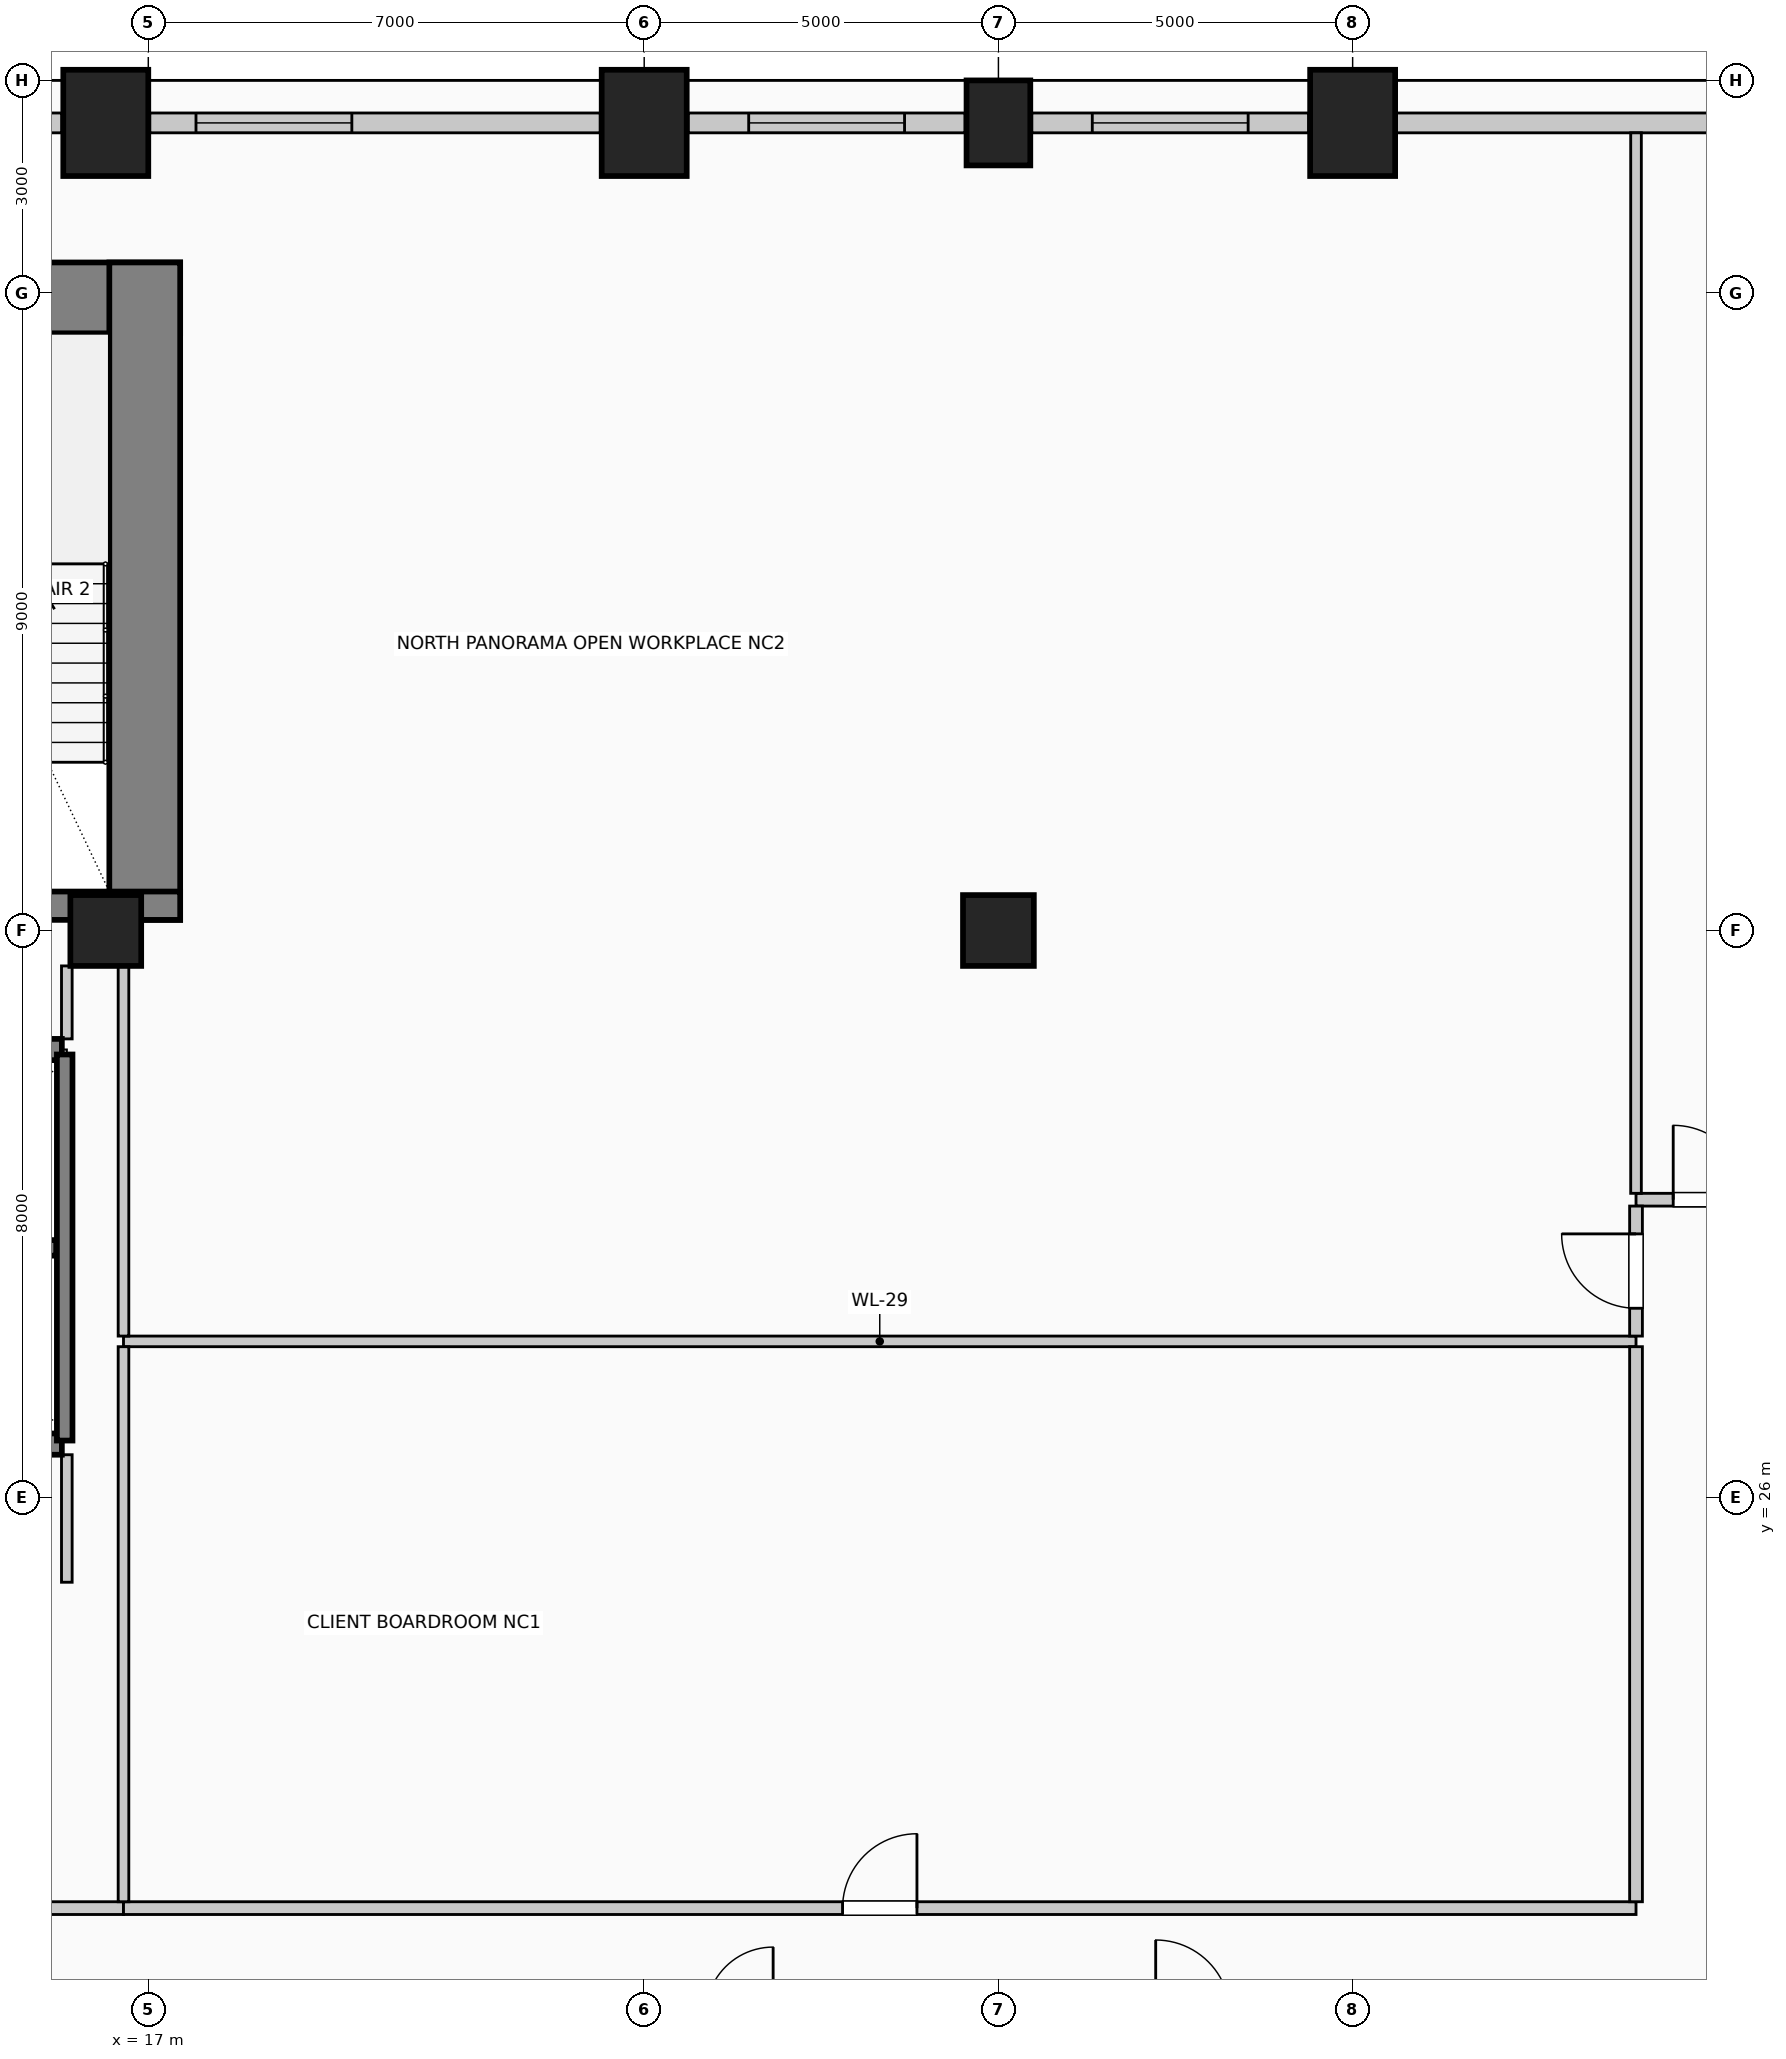
"""IFC4 building model, lengths in metres.
Left out: names, types, materials, properties, quantities, classifications, styles, units other than length and angle.
Written with IfcOpenShell. Run it as: python <this file> out.ifc"""

import sys

from ifc_helpers import new_model, si_unit, direction, frame, frame_2d, origin, origin_2d, place, context, subcontext, project, spatial, rectangle, circle, extrude, element, fill, save


model = new_model("IFC4")
c1 = context("Model", 3, precision=1e-05, world=origin(), true_north=direction((0.0, 1.0)))
c2 = subcontext(c1, "Body", "Model", "MODEL_VIEW")
j1 = project(units=[si_unit("LENGTHUNIT", "METRE"), si_unit("PLANEANGLEUNIT", "RADIAN")], contexts=[c1])
p1 = place(None, origin())
s1 = spatial("IfcSite", under=j1, at=p1, CompositionType="ELEMENT")
p2 = place(p1, origin())
s2 = spatial("IfcBuilding", under=s1, at=p2, CompositionType="ELEMENT")
p3 = place(p2, frame((0.0, 0.0, 66.6)))
s3 = spatial("IfcBuildingStorey", under=s2, at=p3, CompositionType="ELEMENT", Elevation=66.6)
p4 = place(p3, frame((2.55, 42.93, 0.0), z_axis=(0.0, 0.0, 1.0), x_axis=(1.0, 0.0, 0.0)))
e1 = element("IfcWall", 1, at=p4, inside=s3, PredefinedType="SHEAR", context=c2, shape_type="SweptSolid", body=[
    extrude(rectangle(XDim=14.9, YDim=1.0, at=frame_2d((7.45, 0.0))), origin(), (0.0, 0.0, 1.0), 4.0),
])
p5 = place(p3, frame((16.95, 34.15, 0.0), z_axis=(0.0, 0.0, 1.0), x_axis=(0.0, 1.0, 0.0)))
e2 = element("IfcWall", 2, at=p5, inside=s3, PredefinedType="SHEAR", context=c2, shape_type="SweptSolid", body=[
    extrude(rectangle(XDim=9.28, YDim=1.0, at=frame_2d((4.64, 0.0))), origin(), (0.0, 0.0, 1.0), 4.0),
])
p6 = place(p3, frame((12.29, 34.35, 0.0), z_axis=(0.0, 0.0, 1.0), x_axis=(1.0, 0.0, 0.0)))
e3 = element("IfcWall", 3, at=p6, inside=s3, PredefinedType="SHEAR", context=c2, shape_type="SweptSolid", body=[
    extrude(rectangle(XDim=5.16, YDim=0.4, at=frame_2d((2.58, 0.0))), origin(), (0.0, 0.0, 1.0), 4.0),
])
p7 = place(p6, frame((1.4, 0.0, 0.0)))
e4 = element("IfcOpeningElement", 4, at=p7, cuts=e3, PredefinedType="OPENING", context=c2, shape_type="SweptSolid", body=[
    extrude(rectangle(XDim=1.15, YDim=2.2, at=frame_2d((0.575, 1.1))), frame((0.0, 0.21, 0.0), z_axis=(0.0, -1.0, 0.0), x_axis=(1.0, 0.0, 0.0)), (0.0, 0.0, 1.0), 0.42),
])
for number, where, z_axis, x_axis in (
    (5, (16.4, 45.4, 0.0), (0.0, 0.0, 1.0), (1.0, 0.0, 0.0)),
    (6, (24.0, 45.4, 0.0), (0.0, 0.0, 1.0), (1.0, 0.0, 0.0)),
):
    element("IfcColumn", number, at=place(p3, frame(where, z_axis=z_axis, x_axis=x_axis)), inside=s3, PredefinedType="COLUMN", context=c2, shape_type="SweptSolid", body=[
        extrude(rectangle(XDim=1.2, YDim=1.5, at=origin_2d()), origin(), (0.0, 0.0, 1.0), 4.0),
    ])
p8 = place(p3, frame((29.0, 45.4, 0.0), z_axis=(0.0, 0.0, 1.0), x_axis=(1.0, 0.0, 0.0)))
e7 = element("IfcColumn", 7, at=p8, inside=s3, PredefinedType="COLUMN", context=c2, shape_type="SweptSolid", body=[
    extrude(rectangle(XDim=0.9, YDim=1.2, at=origin_2d()), origin(), (0.0, 0.0, 1.0), 4.0),
])
p9 = place(p3, frame((34.0, 45.4, 0.0), z_axis=(0.0, 0.0, 1.0), x_axis=(1.0, 0.0, 0.0)))
e8 = element("IfcColumn", 8, at=p9, inside=s3, PredefinedType="COLUMN", context=c2, shape_type="SweptSolid", body=[
    extrude(rectangle(XDim=1.2, YDim=1.5, at=origin_2d()), origin(), (0.0, 0.0, 1.0), 4.0),
])
for number, where, z_axis, x_axis in (
    (9, (16.4, 34.0, 0.0), (0.0, 0.0, 1.0), (1.0, 0.0, 0.0)),
    (10, (29.0, 34.0, 0.0), (0.0, 0.0, 1.0), (1.0, 0.0, 0.0)),
):
    element("IfcColumn", number, at=place(p3, frame(where, z_axis=z_axis, x_axis=x_axis)), inside=s3, PredefinedType="COLUMN", context=c2, shape_type="SweptSolid", body=[
        extrude(circle(Radius=0.5, at=origin_2d()), origin(), (0.0, 0.0, 1.0), 4.0),
    ])
p10 = place(p3, frame((14.47, 45.4, 0.0), z_axis=(0.0, 0.0, 1.0), x_axis=(1.0, 0.0, 0.0)))
e11 = element("IfcWall", 11, at=p10, inside=s3, PredefinedType="SOLIDWALL", context=c2, shape_type="SweptSolid", body=[
    extrude(rectangle(XDim=1.31, YDim=0.28, at=frame_2d((0.655, 0.0))), origin(), (0.0, 0.0, 1.0), 2.85),
])
p11 = place(p3, frame((17.02, 45.4, 0.0), z_axis=(0.0, 0.0, 1.0), x_axis=(1.0, 0.0, 0.0)))
e12 = element("IfcWall", 12, at=p11, inside=s3, PredefinedType="SOLIDWALL", context=c2, shape_type="SweptSolid", body=[
    extrude(rectangle(XDim=6.36, YDim=0.28, at=frame_2d((3.18, 0.0))), origin(), (0.0, 0.0, 1.0), 2.85),
])
p12 = place(p11, frame((0.653, 0.0, 0.5)))
e13 = element("IfcOpeningElement", 13, at=p12, cuts=e12, PredefinedType="OPENING", context=c2, shape_type="SweptSolid", body=[
    extrude(rectangle(XDim=2.2, YDim=1.95, at=frame_2d((1.1, 0.975))), frame((0.0, 0.15, 0.0), z_axis=(0.0, -1.0, 0.0), x_axis=(1.0, 0.0, 0.0)), (0.0, 0.0, 1.0), 0.3),
])
p13 = place(p3, frame((24.62, 45.4, 0.0), z_axis=(0.0, 0.0, 1.0), x_axis=(1.0, 0.0, 0.0)))
e14 = element("IfcWall", 14, at=p13, inside=s3, PredefinedType="SOLIDWALL", context=c2, shape_type="SweptSolid", body=[
    extrude(rectangle(XDim=3.91, YDim=0.28, at=frame_2d((1.955, 0.0))), origin(), (0.0, 0.0, 1.0), 2.85),
])
p14 = place(p13, frame((0.855, 0.0, 0.5)))
e15 = element("IfcOpeningElement", 15, at=p14, cuts=e14, PredefinedType="OPENING", context=c2, shape_type="SweptSolid", body=[
    extrude(rectangle(XDim=2.2, YDim=1.95, at=frame_2d((1.1, 0.975))), frame((0.0, 0.15, 0.0), z_axis=(0.0, -1.0, 0.0), x_axis=(1.0, 0.0, 0.0)), (0.0, 0.0, 1.0), 0.3),
])
p15 = place(p3, frame((29.47, 45.4, 0.0), z_axis=(0.0, 0.0, 1.0), x_axis=(1.0, 0.0, 0.0)))
e16 = element("IfcWall", 16, at=p15, inside=s3, PredefinedType="SOLIDWALL", context=c2, shape_type="SweptSolid", body=[
    extrude(rectangle(XDim=3.91, YDim=0.28, at=frame_2d((1.955, 0.0))), origin(), (0.0, 0.0, 1.0), 2.85),
])
p16 = place(p15, frame((0.855, 0.0, 0.5)))
e17 = element("IfcOpeningElement", 17, at=p16, cuts=e16, PredefinedType="OPENING", context=c2, shape_type="SweptSolid", body=[
    extrude(rectangle(XDim=2.2, YDim=1.95, at=frame_2d((1.1, 0.975))), frame((0.0, 0.15, 0.0), z_axis=(0.0, -1.0, 0.0), x_axis=(1.0, 0.0, 0.0)), (0.0, 0.0, 1.0), 0.3),
])
p17 = place(p3, frame((34.62, 45.4, 0.0), z_axis=(0.0, 0.0, 1.0), x_axis=(1.0, 0.0, 0.0)))
e18 = element("IfcWall", 18, at=p17, inside=s3, PredefinedType="SOLIDWALL", context=c2, shape_type="SweptSolid", body=[
    extrude(rectangle(XDim=6.36, YDim=0.28, at=frame_2d((3.18, 0.0))), origin(), (0.0, 0.0, 1.0), 2.85),
])
for number, where, z_axis, x_axis in (
    (19, (15.78, 26.75, 0.0), (0.0, 0.0, 1.0), (-1.0, 0.0, 0.0)),
    (20, (14.0, 32.32, 0.0), (0.0, 0.0, 1.0), (1.0, 0.0, 0.0)),
):
    element("IfcWall", number, at=place(p3, frame(where, z_axis=z_axis, x_axis=x_axis)), inside=s3, PredefinedType="SOLIDWALL", context=c2, shape_type="SweptSolid", body=[
        extrude(rectangle(XDim=1.78, YDim=0.3, at=frame_2d((0.89, 0.0))), origin(), (0.0, 0.0, 1.0), 4.0),
    ])
p18 = place(p3, frame((15.82, 26.8, 0.0), z_axis=(0.0, 0.0, 1.0), x_axis=(0.0, 1.0, 0.0)))
e21 = element("IfcWall", 21, at=p18, inside=s3, PredefinedType="SOLIDWALL", context=c2, shape_type="SweptSolid", body=[
    extrude(rectangle(XDim=5.45, YDim=0.22, at=frame_2d((2.725, 0.0))), origin(), (0.0, 0.0, 1.0), 4.0),
])
p19 = place(p3, frame((12.3, 29.52, 0.0), z_axis=(0.0, 0.0, 1.0), x_axis=(1.0, 0.0, 0.0)))
e22 = element("IfcWall", 22, at=p19, inside=s3, PredefinedType="SOLIDWALL", context=c2, shape_type="SweptSolid", body=[
    extrude(rectangle(XDim=3.4, YDim=0.22, at=frame_2d((1.7, 0.0))), origin(), (0.0, 0.0, 1.0), 4.0),
])
p20 = place(p3, frame((12.2, 20.2, 0.0), z_axis=(0.0, 0.0, 1.0), x_axis=(1.0, 0.0, 0.0)))
e23 = element("IfcWall", 23, at=p20, inside=s3, PredefinedType="PARTITIONING", context=c2, shape_type="SweptSolid", body=[
    extrude(rectangle(XDim=4.45, YDim=0.18, at=frame_2d((2.225, 0.0))), origin(), (0.0, 0.0, 1.0), 3.7),
])
p21 = place(p3, frame((16.65, 20.2, 0.0), z_axis=(0.0, 0.0, 1.0), x_axis=(1.0, 0.0, 0.0)))
e24 = element("IfcWall", 24, at=p21, inside=s3, PredefinedType="PARTITIONING", context=c2, shape_type="SweptSolid", body=[
    extrude(rectangle(XDim=21.35, YDim=0.18, at=frame_2d((10.675, 0.0))), origin(), (0.0, 0.0, 1.0), 3.7),
])
p22 = place(p21, frame((10.15, 0.0, 0.0)))
e25 = element("IfcOpeningElement", 25, at=p22, cuts=e24, PredefinedType="OPENING", context=c2, shape_type="SweptSolid", body=[
    extrude(rectangle(XDim=1.05, YDim=2.15, at=frame_2d((0.525, 1.075))), frame((0.0, 0.1, 0.0), z_axis=(0.0, -1.0, 0.0), x_axis=(1.0, 0.0, 0.0)), (0.0, 0.0, 1.0), 0.2),
])
p23 = place(p3, frame((16.65, 28.2, 0.0), z_axis=(0.0, 0.0, 1.0), x_axis=(1.0, 0.0, 0.0)))
e26 = element("IfcWall", 26, at=p23, inside=s3, PredefinedType="PARTITIONING", context=c2, shape_type="SweptSolid", body=[
    extrude(rectangle(XDim=21.35, YDim=0.15, at=frame_2d((10.675, 0.0))), origin(), (0.0, 0.0, 1.0), 3.7),
])
p24 = place(p3, frame((38.0, 30.2, 0.0), z_axis=(0.0, 0.0, 1.0), x_axis=(1.0, 0.0, 0.0)))
e27 = element("IfcWall", 27, at=p24, inside=s3, PredefinedType="PARTITIONING", context=c2, shape_type="SweptSolid", body=[
    extrude(rectangle(XDim=2.1, YDim=0.18, at=frame_2d((1.05, 0.0))), origin(), (0.0, 0.0, 1.0), 3.7),
])
p25 = place(p24, frame((0.525, 0.0, 0.0)))
e28 = element("IfcOpeningElement", 28, at=p25, cuts=e27, PredefinedType="OPENING", context=c2, shape_type="SweptSolid", body=[
    extrude(rectangle(XDim=1.05, YDim=2.15, at=frame_2d((0.525, 1.075))), frame((0.0, 0.1, 0.0), z_axis=(0.0, -1.0, 0.0), x_axis=(1.0, 0.0, 0.0)), (0.0, 0.0, 1.0), 0.2),
])
p26 = place(p3, frame((15.85, 24.8, 0.0), z_axis=(0.0, 0.0, 1.0), x_axis=(0.0, 1.0, 0.0)))
e29 = element("IfcWall", 29, at=p26, inside=s3, PredefinedType="PARTITIONING", context=c2, shape_type="SweptSolid", body=[
    extrude(rectangle(XDim=1.8, YDim=0.15, at=frame_2d((0.9, 0.0))), origin(), (0.0, 0.0, 1.0), 3.7),
])
p27 = place(p3, frame((15.85, 32.47, 0.0), z_axis=(0.0, 0.0, 1.0), x_axis=(0.0, 1.0, 0.0)))
e30 = element("IfcWall", 30, at=p27, inside=s3, PredefinedType="PARTITIONING", context=c2, shape_type="SweptSolid", body=[
    extrude(rectangle(XDim=1.03, YDim=0.15, at=frame_2d((0.515, 0.0))), origin(), (0.0, 0.0, 1.0), 3.7),
])
p28 = place(p3, frame((16.65, 20.29, 0.0), z_axis=(0.0, 0.0, 1.0), x_axis=(0.0, 1.0, 0.0)))
e31 = element("IfcWall", 31, at=p28, inside=s3, PredefinedType="PARTITIONING", context=c2, shape_type="SweptSolid", body=[
    extrude(rectangle(XDim=7.835, YDim=0.15, at=frame_2d((3.917, 0.0))), origin(), (0.0, 0.0, 1.0), 2.995),
])
p29 = place(p3, frame((16.65, 28.275, 0.0), z_axis=(0.0, 0.0, 1.0), x_axis=(0.0, 1.0, 0.0)))
e32 = element("IfcWall", 32, at=p29, inside=s3, PredefinedType="PARTITIONING", context=c2, shape_type="SweptSolid", body=[
    extrude(rectangle(XDim=5.225, YDim=0.15, at=frame_2d((2.613, 0.0))), origin(), (0.0, 0.0, 1.0), 2.995),
])
p30 = place(p3, frame((38.0, 20.29, 0.0), z_axis=(0.0, 0.0, 1.0), x_axis=(0.0, 1.0, 0.0)))
e33 = element("IfcWall", 33, at=p30, inside=s3, PredefinedType="PARTITIONING", context=c2, shape_type="SweptSolid", body=[
    extrude(rectangle(XDim=7.835, YDim=0.18, at=frame_2d((3.917, 0.0))), origin(), (0.0, 0.0, 1.0), 3.7),
])
p31 = place(p3, frame((38.0, 28.275, 0.0), z_axis=(0.0, 0.0, 1.0), x_axis=(0.0, 1.0, 0.0)))
e34 = element("IfcWall", 34, at=p31, inside=s3, PredefinedType="PARTITIONING", context=c2, shape_type="SweptSolid", body=[
    extrude(rectangle(XDim=1.835, YDim=0.18, at=frame_2d((0.917, 0.0))), origin(), (0.0, 0.0, 1.0), 3.7),
])
p32 = place(p31, frame((0.393, 0.0, 0.0)))
e35 = element("IfcOpeningElement", 35, at=p32, cuts=e34, PredefinedType="OPENING", context=c2, shape_type="SweptSolid", body=[
    extrude(rectangle(XDim=1.05, YDim=2.15, at=frame_2d((0.525, 1.075))), frame((0.0, 0.1, 0.0), z_axis=(0.0, -1.0, 0.0), x_axis=(1.0, 0.0, 0.0)), (0.0, 0.0, 1.0), 0.2),
])
p33 = place(p3, frame((38.0, 30.29, 0.0), z_axis=(0.0, 0.0, 1.0), x_axis=(0.0, 1.0, 0.0)))
e36 = element("IfcWall", 36, at=p33, inside=s3, PredefinedType="PARTITIONING", context=c2, shape_type="SweptSolid", body=[
    extrude(rectangle(XDim=14.97, YDim=0.15, at=frame_2d((7.485, 0.0))), origin(), (0.0, 0.0, 1.0), 3.7),
])
p34 = place(p12, origin())
e37 = element("IfcWindow", 37, at=p34, inside=s3, PartitioningType="SINGLE_PANEL", PredefinedType="WINDOW", context=c2, shape_type="SweptSolid", body=[
    extrude(rectangle(XDim=2.2, YDim=1.95, at=frame_2d((1.1, 0.975))), frame((0.0, 0.03, 0.0), z_axis=(0.0, -1.0, 0.0), x_axis=(1.0, 0.0, 0.0)), (0.0, 0.0, 1.0), 0.06),
])
fill(e13, e37)
p35 = place(p14, origin())
e38 = element("IfcWindow", 38, at=p35, inside=s3, PartitioningType="SINGLE_PANEL", PredefinedType="WINDOW", context=c2, shape_type="SweptSolid", body=[
    extrude(rectangle(XDim=2.2, YDim=1.95, at=frame_2d((1.1, 0.975))), frame((0.0, 0.03, 0.0), z_axis=(0.0, -1.0, 0.0), x_axis=(1.0, 0.0, 0.0)), (0.0, 0.0, 1.0), 0.06),
])
fill(e15, e38)
p36 = place(p16, origin())
e39 = element("IfcWindow", 39, at=p36, inside=s3, PartitioningType="SINGLE_PANEL", PredefinedType="WINDOW", context=c2, shape_type="SweptSolid", body=[
    extrude(rectangle(XDim=2.2, YDim=1.95, at=frame_2d((1.1, 0.975))), frame((0.0, 0.03, 0.0), z_axis=(0.0, -1.0, 0.0), x_axis=(1.0, 0.0, 0.0)), (0.0, 0.0, 1.0), 0.06),
])
fill(e17, e39)
p37 = place(p22, origin())
e40 = element("IfcDoor", 40, at=p37, inside=s3, OperationType="SINGLE_SWING_RIGHT", PredefinedType="DOOR", context=c2, shape_type="SweptSolid", body=[
    extrude(rectangle(XDim=1.05, YDim=2.15, at=frame_2d((0.525, 1.075))), frame((0.0, 0.025, 0.0), z_axis=(0.0, -1.0, 0.0), x_axis=(1.0, 0.0, 0.0)), (0.0, 0.0, 1.0), 0.05),
])
fill(e25, e40)
p38 = place(p25, origin())
e41 = element("IfcDoor", 41, at=p38, inside=s3, OperationType="SINGLE_SWING_LEFT", PredefinedType="DOOR", context=c2, shape_type="SweptSolid", body=[
    extrude(rectangle(XDim=1.05, YDim=2.15, at=frame_2d((0.525, 1.075))), frame((0.0, 0.025, 0.0), z_axis=(0.0, -1.0, 0.0), x_axis=(1.0, 0.0, 0.0)), (0.0, 0.0, 1.0), 0.05),
])
fill(e28, e41)
p39 = place(p32, origin())
e42 = element("IfcDoor", 42, at=p39, inside=s3, OperationType="SINGLE_SWING_RIGHT", PredefinedType="DOOR", context=c2, shape_type="SweptSolid", body=[
    extrude(rectangle(XDim=1.05, YDim=2.15, at=frame_2d((0.525, 1.075))), frame((0.0, 0.025, 0.0), z_axis=(0.0, -1.0, 0.0), x_axis=(1.0, 0.0, 0.0)), (0.0, 0.0, 1.0), 0.05),
])
fill(e35, e42)
save(model, sys.argv[1])
